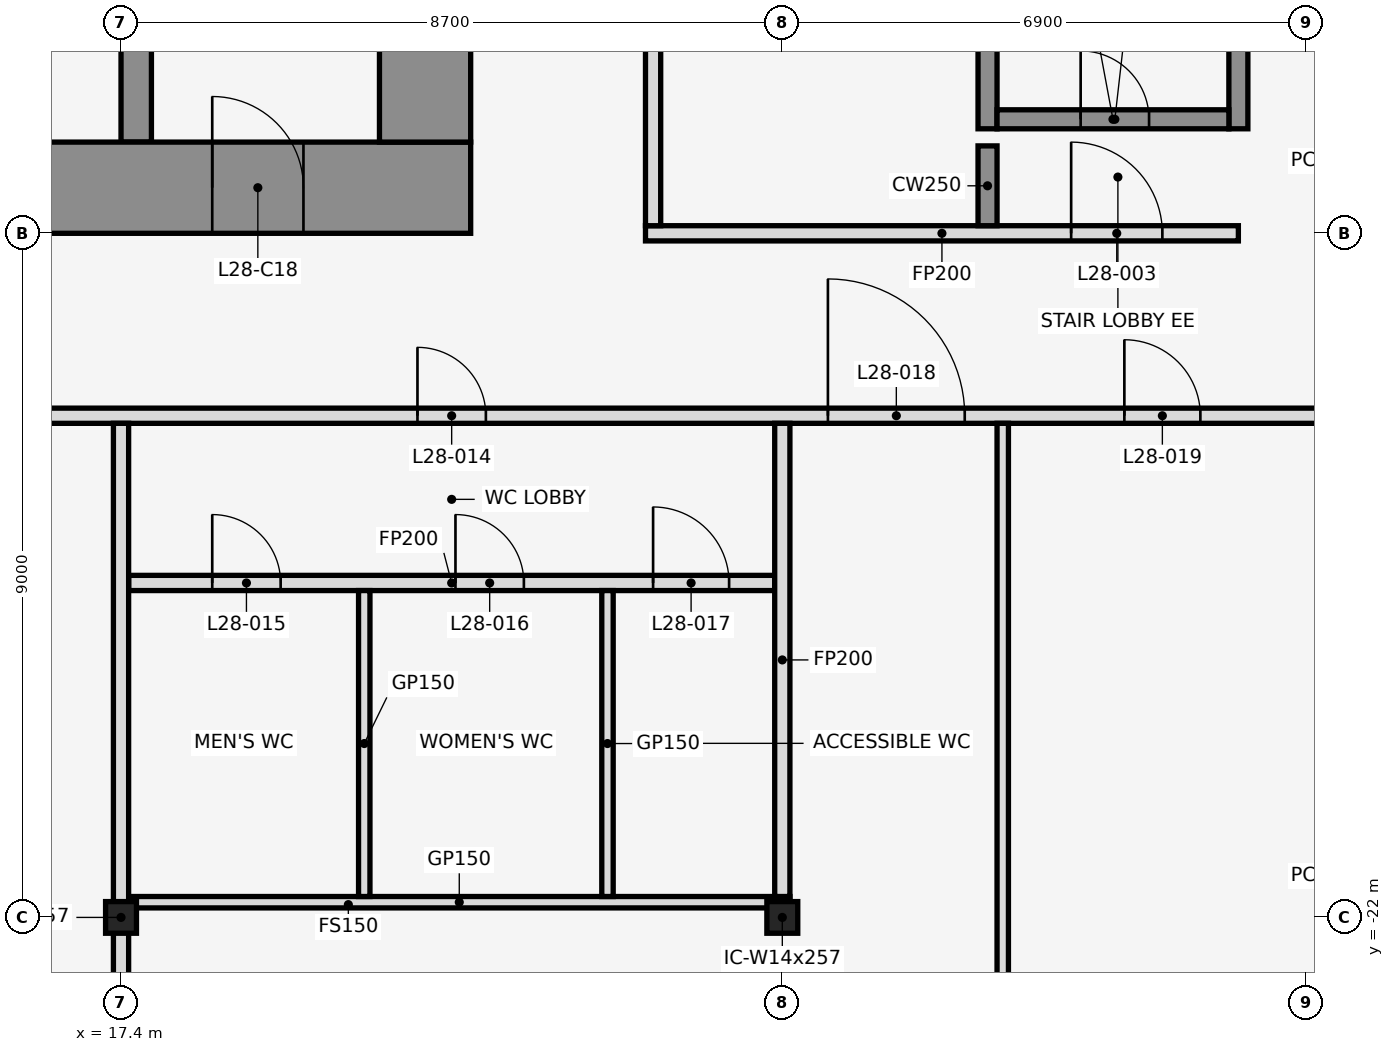
"""IFC4 building model, lengths in metres.
Left out: names, types, materials, properties, quantities, classifications, styles, units other than length and angle.
Written with IfcOpenShell. Run it as: python <this file> out.ifc"""

import sys

from ifc_helpers import new_model, si_unit, direction, frame, frame_2d, origin, origin_2d, place, context, subcontext, project, spatial, rectangle, i_section, extrude, element, fill, save


model = new_model("IFC4")
c1 = context("Model", 3, precision=1e-05, world=origin(), true_north=direction((0.0, 1.0)))
c2 = subcontext(c1, "Body", "Model", "MODEL_VIEW")
j1 = project(units=[si_unit("LENGTHUNIT", "METRE"), si_unit("PLANEANGLEUNIT", "RADIAN")], contexts=[c1])
p1 = place(None, origin())
s1 = spatial("IfcSite", under=j1, at=p1, CompositionType="ELEMENT")
p2 = place(p1, origin())
s2 = spatial("IfcBuilding", under=s1, at=p2, CompositionType="ELEMENT")
p3 = place(p2, frame((0.0, 0.0, 130.9)))
s3 = spatial("IfcBuildingStorey", under=s2, at=p3, CompositionType="ELEMENT", Elevation=130.9)
for number, where, z_axis, x_axis in (
    (1, (17.4, -22.0, 0.0), (0.0, 0.0, 1.0), (1.0, 0.0, 0.0)),
    (2, (26.1, -22.0, 0.0), (0.0, 0.0, 1.0), (1.0, 0.0, 0.0)),
):
    element("IfcColumn", number, at=place(p3, frame(where, z_axis=z_axis, x_axis=x_axis)), inside=s3, PredefinedType="COLUMN", context=c2, shape_type="SweptSolid", body=[
        extrude(i_section(OverallWidth=0.406, OverallDepth=0.417, WebThickness=0.03, FlangeThickness=0.048, at=origin_2d()), origin(), (0.0, 0.0, 1.0), 4.1),
    ])
for number, where, z_axis, x_axis in (
    (3, (28.8, -11.625, 0.0), (0.0, 0.0, 1.0), (0.0, 1.0, 0.0)),
    (4, (32.1, -11.625, 0.0), (0.0, 0.0, 1.0), (0.0, 1.0, 0.0)),
):
    element("IfcWall", number, at=place(p3, frame(where, z_axis=z_axis, x_axis=x_axis)), inside=s3, PredefinedType="SHEAR", context=c2, shape_type="SweptSolid", body=[
        extrude(rectangle(XDim=7.25, YDim=0.25, at=frame_2d((3.625, 0.0))), origin(), (0.0, 0.0, 1.0), 4.1),
    ])
p4 = place(p3, frame((28.925, -11.5, 0.0), z_axis=(0.0, 0.0, 1.0), x_axis=(1.0, 0.0, 0.0)))
e5 = element("IfcWall", 5, at=p4, inside=s3, PredefinedType="SHEAR", context=c2, shape_type="SweptSolid", body=[
    extrude(rectangle(XDim=3.05, YDim=0.25, at=frame_2d((1.525, 0.0))), origin(), (0.0, 0.0, 1.0), 4.1),
])
p5 = place(p4, frame((1.1, 0.0, 0.0)))
e6 = element("IfcOpeningElement", 6, at=p5, cuts=e5, PredefinedType="OPENING", context=c2, shape_type="SweptSolid", body=[
    extrude(rectangle(XDim=0.9, YDim=2.1, at=frame_2d((0.45, 1.05))), frame((0.0, 0.137, 0.0), z_axis=(0.0, -1.0, 0.0), x_axis=(1.0, 0.0, 0.0)), (0.0, 0.0, 1.0), 0.274),
])
p6 = place(p3, frame((17.5, -21.8, 0.0), z_axis=(0.0, 0.0, 1.0), x_axis=(1.0, 0.0, 0.0)))
e7 = element("IfcWall", 7, at=p6, inside=s3, PredefinedType="PARTITIONING", context=c2, shape_type="SweptSolid", body=[
    extrude(rectangle(XDim=8.7, YDim=0.15, at=frame_2d((4.35, 0.0))), origin(), (0.0, 0.0, 1.0), 2.968),
])
p7 = place(p3, frame((17.5, -17.6, 0.0), z_axis=(0.0, 0.0, 1.0), x_axis=(1.0, 0.0, 0.0)))
e8 = element("IfcWall", 8, at=p7, inside=s3, PredefinedType="PARTITIONING", context=c2, shape_type="SweptSolid", body=[
    extrude(rectangle(XDim=8.5, YDim=0.2, at=frame_2d((4.25, 0.0))), origin(), (0.0, 0.0, 1.0), 2.968),
])
p8 = place(p7, frame((1.1, 0.0, 0.0)))
e9 = element("IfcOpeningElement", 9, at=p8, cuts=e8, PredefinedType="OPENING", context=c2, shape_type="SweptSolid", body=[
    extrude(rectangle(XDim=0.9, YDim=2.1, at=frame_2d((0.45, 1.05))), frame((0.0, 0.112, 0.0), z_axis=(0.0, -1.0, 0.0), x_axis=(1.0, 0.0, 0.0)), (0.0, 0.0, 1.0), 0.224),
])
p9 = place(p7, frame((4.3, 0.0, 0.0)))
e10 = element("IfcOpeningElement", 10, at=p9, cuts=e8, PredefinedType="OPENING", context=c2, shape_type="SweptSolid", body=[
    extrude(rectangle(XDim=0.9, YDim=2.1, at=frame_2d((0.45, 1.05))), frame((0.0, 0.112, 0.0), z_axis=(0.0, -1.0, 0.0), x_axis=(1.0, 0.0, 0.0)), (0.0, 0.0, 1.0), 0.224),
])
p10 = place(p7, frame((6.9, 0.0, 0.0)))
e11 = element("IfcOpeningElement", 11, at=p10, cuts=e8, PredefinedType="OPENING", context=c2, shape_type="SweptSolid", body=[
    extrude(rectangle(XDim=1.0, YDim=2.1, at=frame_2d((0.5, 1.05))), frame((0.0, 0.112, 0.0), z_axis=(0.0, -1.0, 0.0), x_axis=(1.0, 0.0, 0.0)), (0.0, 0.0, 1.0), 0.224),
])
p11 = place(p3, frame((-33.37, -15.4, 0.0), z_axis=(0.0, 0.0, 1.0), x_axis=(1.0, 0.0, 0.0)))
e12 = element("IfcWall", 12, at=p11, inside=s3, PredefinedType="PARTITIONING", context=c2, shape_type="SweptSolid", body=[
    extrude(rectangle(XDim=66.74, YDim=0.2, at=frame_2d((33.37, 0.0))), origin(), (0.0, 0.0, 1.0), 2.968),
])
p12 = place(p11, frame((1.7, 0.0, 0.0)))
e13 = element("IfcOpeningElement", 13, at=p12, cuts=e12, PredefinedType="OPENING", context=c2, shape_type="SweptSolid", body=[
    extrude(rectangle(XDim=1.0, YDim=2.1, at=frame_2d((0.5, 1.05))), frame((0.0, 0.112, 0.0), z_axis=(0.0, -1.0, 0.0), x_axis=(1.0, 0.0, 0.0)), (0.0, 0.0, 1.0), 0.224),
])
p13 = place(p11, frame((7.87, 0.0, 0.0)))
e14 = element("IfcOpeningElement", 14, at=p13, cuts=e12, PredefinedType="OPENING", context=c2, shape_type="SweptSolid", body=[
    extrude(rectangle(XDim=1.8, YDim=2.1, at=frame_2d((0.9, 1.05))), frame((0.0, 0.112, 0.0), z_axis=(0.0, -1.0, 0.0), x_axis=(1.0, 0.0, 0.0)), (0.0, 0.0, 1.0), 0.224),
])
p14 = place(p11, frame((15.07, 0.0, 0.0)))
e15 = element("IfcOpeningElement", 15, at=p14, cuts=e12, PredefinedType="OPENING", context=c2, shape_type="SweptSolid", body=[
    extrude(rectangle(XDim=1.8, YDim=2.1, at=frame_2d((0.9, 1.05))), frame((0.0, 0.112, 0.0), z_axis=(0.0, -1.0, 0.0), x_axis=(1.0, 0.0, 0.0)), (0.0, 0.0, 1.0), 0.224),
])
p15 = place(p11, frame((22.27, 0.0, 0.0)))
e16 = element("IfcOpeningElement", 16, at=p15, cuts=e12, PredefinedType="OPENING", context=c2, shape_type="SweptSolid", body=[
    extrude(rectangle(XDim=1.8, YDim=2.1, at=frame_2d((0.9, 1.05))), frame((0.0, 0.112, 0.0), z_axis=(0.0, -1.0, 0.0), x_axis=(1.0, 0.0, 0.0)), (0.0, 0.0, 1.0), 0.224),
])
p16 = place(p11, frame((30.97, 0.0, 0.0)))
e17 = element("IfcOpeningElement", 17, at=p16, cuts=e12, PredefinedType="OPENING", context=c2, shape_type="SweptSolid", body=[
    extrude(rectangle(XDim=1.8, YDim=2.1, at=frame_2d((0.9, 1.05))), frame((0.0, 0.112, 0.0), z_axis=(0.0, -1.0, 0.0), x_axis=(1.0, 0.0, 0.0)), (0.0, 0.0, 1.0), 0.224),
])
p17 = place(p11, frame((39.67, 0.0, 0.0)))
e18 = element("IfcOpeningElement", 18, at=p17, cuts=e12, PredefinedType="OPENING", context=c2, shape_type="SweptSolid", body=[
    extrude(rectangle(XDim=1.8, YDim=2.1, at=frame_2d((0.9, 1.05))), frame((0.0, 0.112, 0.0), z_axis=(0.0, -1.0, 0.0), x_axis=(1.0, 0.0, 0.0)), (0.0, 0.0, 1.0), 0.224),
])
p18 = place(p11, frame((46.97, 0.0, 0.0)))
e19 = element("IfcOpeningElement", 19, at=p18, cuts=e12, PredefinedType="OPENING", context=c2, shape_type="SweptSolid", body=[
    extrude(rectangle(XDim=1.8, YDim=2.1, at=frame_2d((0.9, 1.05))), frame((0.0, 0.112, 0.0), z_axis=(0.0, -1.0, 0.0), x_axis=(1.0, 0.0, 0.0)), (0.0, 0.0, 1.0), 0.224),
])
p19 = place(p11, frame((54.67, 0.0, 0.0)))
e20 = element("IfcOpeningElement", 20, at=p19, cuts=e12, PredefinedType="OPENING", context=c2, shape_type="SweptSolid", body=[
    extrude(rectangle(XDim=0.9, YDim=2.1, at=frame_2d((0.45, 1.05))), frame((0.0, 0.112, 0.0), z_axis=(0.0, -1.0, 0.0), x_axis=(1.0, 0.0, 0.0)), (0.0, 0.0, 1.0), 0.224),
])
p20 = place(p11, frame((60.07, 0.0, 0.0)))
e21 = element("IfcOpeningElement", 21, at=p20, cuts=e12, PredefinedType="OPENING", context=c2, shape_type="SweptSolid", body=[
    extrude(rectangle(XDim=1.8, YDim=2.1, at=frame_2d((0.9, 1.05))), frame((0.0, 0.112, 0.0), z_axis=(0.0, -1.0, 0.0), x_axis=(1.0, 0.0, 0.0)), (0.0, 0.0, 1.0), 0.224),
])
p21 = place(p11, frame((63.97, 0.0, 0.0)))
e22 = element("IfcOpeningElement", 22, at=p21, cuts=e12, PredefinedType="OPENING", context=c2, shape_type="SweptSolid", body=[
    extrude(rectangle(XDim=1.0, YDim=2.1, at=frame_2d((0.5, 1.05))), frame((0.0, 0.112, 0.0), z_axis=(0.0, -1.0, 0.0), x_axis=(1.0, 0.0, 0.0)), (0.0, 0.0, 1.0), 0.224),
])
p22 = place(p3, frame((24.3, -13.0, 0.0), z_axis=(0.0, 0.0, 1.0), x_axis=(1.0, 0.0, 0.0)))
e23 = element("IfcWall", 23, at=p22, inside=s3, PredefinedType="PARTITIONING", context=c2, shape_type="SweptSolid", body=[
    extrude(rectangle(XDim=7.8, YDim=0.2, at=frame_2d((3.9, 0.0))), origin(), (0.0, 0.0, 1.0), 2.968),
])
p23 = place(p22, frame((5.6, 0.0, 0.0)))
e24 = element("IfcOpeningElement", 24, at=p23, cuts=e23, PredefinedType="OPENING", context=c2, shape_type="SweptSolid", body=[
    extrude(rectangle(XDim=1.2, YDim=2.1, at=frame_2d((0.6, 1.05))), frame((0.0, 0.112, 0.0), z_axis=(0.0, -1.0, 0.0), x_axis=(1.0, 0.0, 0.0)), (0.0, 0.0, 1.0), 0.224),
])
p24 = place(p3, frame((17.4, -33.744, 0.0), z_axis=(0.0, 0.0, 1.0), x_axis=(0.0, 1.0, 0.0)))
e25 = element("IfcWall", 25, at=p24, inside=s3, PredefinedType="PARTITIONING", context=c2, shape_type="SweptSolid", body=[
    extrude(rectangle(XDim=18.244, YDim=0.2, at=frame_2d((9.122, 0.0))), origin(), (0.0, 0.0, 1.0), 2.968),
])
for number, where, z_axis, x_axis in (
    (26, (20.6, -21.725, 0.0), (0.0, 0.0, 1.0), (0.0, 1.0, 0.0)),
    (27, (23.8, -21.725, 0.0), (0.0, 0.0, 1.0), (0.0, 1.0, 0.0)),
):
    element("IfcWall", number, at=place(p3, frame(where, z_axis=z_axis, x_axis=x_axis)), inside=s3, PredefinedType="PARTITIONING", context=c2, shape_type="SweptSolid", body=[
        extrude(rectangle(XDim=4.025, YDim=0.15, at=frame_2d((2.013, 0.0))), origin(), (0.0, 0.0, 1.0), 2.968),
    ])
p25 = place(p3, frame((24.4, -12.9, 0.0), z_axis=(0.0, 0.0, 1.0), x_axis=(0.0, 1.0, 0.0)))
e28 = element("IfcWall", 28, at=p25, inside=s3, PredefinedType="PARTITIONING", context=c2, shape_type="SweptSolid", body=[
    extrude(rectangle(XDim=12.69, YDim=0.2, at=frame_2d((6.345, 0.0))), origin(), (0.0, 0.0, 1.0), 2.968),
])
p26 = place(p25, frame((5.9, 0.0, 0.0)))
e29 = element("IfcOpeningElement", 29, at=p26, cuts=e28, PredefinedType="OPENING", context=c2, shape_type="SweptSolid", body=[
    extrude(rectangle(XDim=1.0, YDim=2.1, at=frame_2d((0.5, 1.05))), frame((0.0, 0.112, 0.0), z_axis=(0.0, -1.0, 0.0), x_axis=(1.0, 0.0, 0.0)), (0.0, 0.0, 1.0), 0.224),
])
p27 = place(p3, frame((26.1, -21.725, 0.0), z_axis=(0.0, 0.0, 1.0), x_axis=(0.0, 1.0, 0.0)))
e30 = element("IfcWall", 30, at=p27, inside=s3, PredefinedType="PARTITIONING", context=c2, shape_type="SweptSolid", body=[
    extrude(rectangle(XDim=6.225, YDim=0.2, at=frame_2d((3.113, 0.0))), origin(), (0.0, 0.0, 1.0), 2.968),
])
p28 = place(p3, frame((28.8, -12.9, 0.0), z_axis=(0.0, 0.0, 1.0), x_axis=(0.0, 1.0, 0.0)))
e31 = element("IfcWall", 31, at=p28, inside=s3, PredefinedType="SHEAR", context=c2, shape_type="SweptSolid", body=[
    extrude(rectangle(XDim=1.05, YDim=0.25, at=frame_2d((0.525, 0.0))), origin(), (0.0, 0.0, 1.0), 4.1),
])
p29 = place(p3, frame((29.0, -36.42, 0.0), z_axis=(0.0, 0.0, 1.0), x_axis=(0.0, 1.0, 0.0)))
e32 = element("IfcWall", 32, at=p29, inside=s3, PredefinedType="PARTITIONING", context=c2, shape_type="SweptSolid", body=[
    extrude(rectangle(XDim=20.92, YDim=0.15, at=frame_2d((10.46, 0.0))), origin(), (0.0, 0.0, 1.0), 2.968),
])
p30 = place(p3, frame((17.6, -11.8, 0.0), z_axis=(0.0, 0.0, 1.0), x_axis=(0.0, 1.0, 0.0)))
e33 = element("IfcWall", 33, at=p30, inside=s3, PredefinedType="SHEAR", context=c2, shape_type="SweptSolid", body=[
    extrude(rectangle(XDim=10.6, YDim=0.4, at=frame_2d((5.3, 0.0))), origin(), (0.0, 0.0, 1.0), 4.1),
])
p31 = place(p30, frame((1.25, 0.0, 0.0)))
e34 = element("IfcOpeningElement", 34, at=p31, cuts=e33, PredefinedType="OPENING", context=c2, shape_type="SweptSolid", body=[
    extrude(rectangle(XDim=1.1, YDim=2.1, at=frame_2d((0.55, 1.05))), frame((0.0, 0.212, 0.0), z_axis=(0.0, -1.0, 0.0), x_axis=(1.0, 0.0, 0.0)), (0.0, 0.0, 1.0), 0.424),
])
p32 = place(p30, frame((3.95, 0.0, 0.0)))
e35 = element("IfcOpeningElement", 35, at=p32, cuts=e33, PredefinedType="OPENING", context=c2, shape_type="SweptSolid", body=[
    extrude(rectangle(XDim=1.1, YDim=2.1, at=frame_2d((0.55, 1.05))), frame((0.0, 0.212, 0.0), z_axis=(0.0, -1.0, 0.0), x_axis=(1.0, 0.0, 0.0)), (0.0, 0.0, 1.0), 0.424),
])
p33 = place(p3, frame((-22.0, -12.4, 0.0), z_axis=(0.0, 0.0, 1.0), x_axis=(1.0, 0.0, 0.0)))
e36 = element("IfcWall", 36, at=p33, inside=s3, PredefinedType="SHEAR", context=c2, shape_type="SweptSolid", body=[
    extrude(rectangle(XDim=44.0, YDim=1.2, at=frame_2d((22.0, 0.0))), origin(), (0.0, 0.0, 1.0), 4.1),
])
p34 = place(p33, frame((2.2, 0.0, 0.0)))
e37 = element("IfcOpeningElement", 37, at=p34, cuts=e36, PredefinedType="OPENING", context=c2, shape_type="SweptSolid", body=[
    extrude(rectangle(XDim=1.2, YDim=2.1, at=frame_2d((0.6, 1.05))), frame((0.0, 0.612, 0.0), z_axis=(0.0, -1.0, 0.0), x_axis=(1.0, 0.0, 0.0)), (0.0, 0.0, 1.0), 1.224),
])
p35 = place(p33, frame((21.4, 0.0, 0.0)))
e38 = element("IfcOpeningElement", 38, at=p35, cuts=e36, PredefinedType="OPENING", context=c2, shape_type="SweptSolid", body=[
    extrude(rectangle(XDim=1.2, YDim=2.1, at=frame_2d((0.6, 1.05))), frame((0.0, 0.612, 0.0), z_axis=(0.0, -1.0, 0.0), x_axis=(1.0, 0.0, 0.0)), (0.0, 0.0, 1.0), 1.224),
])
p36 = place(p33, frame((40.6, 0.0, 0.0)))
e39 = element("IfcOpeningElement", 39, at=p36, cuts=e36, PredefinedType="OPENING", context=c2, shape_type="SweptSolid", body=[
    extrude(rectangle(XDim=1.2, YDim=2.1, at=frame_2d((0.6, 1.05))), frame((0.0, 0.612, 0.0), z_axis=(0.0, -1.0, 0.0), x_axis=(1.0, 0.0, 0.0)), (0.0, 0.0, 1.0), 1.224),
])
p37 = place(p33, frame((16.0, 0.0, 0.0)))
e40 = element("IfcOpeningElement", 40, at=p37, cuts=e36, PredefinedType="OPENING", context=c2, shape_type="SweptSolid", body=[
    extrude(rectangle(XDim=1.8, YDim=2.1, at=frame_2d((0.9, 1.05))), frame((0.0, 0.612, 0.0), z_axis=(0.0, -1.0, 0.0), x_axis=(1.0, 0.0, 0.0)), (0.0, 0.0, 1.0), 1.224),
])
p38 = place(p33, frame((6.3, 0.0, 0.0)))
e41 = element("IfcOpeningElement", 41, at=p38, cuts=e36, PredefinedType="OPENING", context=c2, shape_type="SweptSolid", body=[
    extrude(rectangle(XDim=1.2, YDim=2.1, at=frame_2d((0.6, 1.05))), frame((0.0, 0.612, 0.0), z_axis=(0.0, -1.0, 0.0), x_axis=(1.0, 0.0, 0.0)), (0.0, 0.0, 1.0), 1.224),
])
p39 = place(p33, frame((26.2, 0.0, 0.0)))
e42 = element("IfcOpeningElement", 42, at=p39, cuts=e36, PredefinedType="OPENING", context=c2, shape_type="SweptSolid", body=[
    extrude(rectangle(XDim=1.8, YDim=2.1, at=frame_2d((0.9, 1.05))), frame((0.0, 0.612, 0.0), z_axis=(0.0, -1.0, 0.0), x_axis=(1.0, 0.0, 0.0)), (0.0, 0.0, 1.0), 1.224),
])
p40 = place(p33, frame((36.5, 0.0, 0.0)))
e43 = element("IfcOpeningElement", 43, at=p40, cuts=e36, PredefinedType="OPENING", context=c2, shape_type="SweptSolid", body=[
    extrude(rectangle(XDim=1.2, YDim=2.1, at=frame_2d((0.6, 1.05))), frame((0.0, 0.612, 0.0), z_axis=(0.0, -1.0, 0.0), x_axis=(1.0, 0.0, 0.0)), (0.0, 0.0, 1.0), 1.224),
])
p41 = place(p3, frame((21.4, -11.8, 0.0), z_axis=(0.0, 0.0, 1.0), x_axis=(0.0, 1.0, 0.0)))
e44 = element("IfcWall", 44, at=p41, inside=s3, PredefinedType="SHEAR", context=c2, shape_type="SweptSolid", body=[
    extrude(rectangle(XDim=10.6, YDim=1.2, at=frame_2d((5.3, 0.0))), origin(), (0.0, 0.0, 1.0), 4.1),
])
p42 = place(p23, origin())
e45 = element("IfcDoor", 45, at=p42, inside=s3, OperationType="SINGLE_SWING_RIGHT", PredefinedType="DOOR", context=c2, shape_type="SweptSolid", body=[
    extrude(rectangle(XDim=1.2, YDim=2.1, at=frame_2d((0.6, 1.05))), frame((0.0, 0.025, 0.0), z_axis=(0.0, -1.0, 0.0), x_axis=(1.0, 0.0, 0.0)), (0.0, 0.0, 1.0), 0.05),
])
fill(e24, e45)
p43 = place(p5, origin())
e46 = element("IfcDoor", 46, at=p43, inside=s3, OperationType="SINGLE_SWING_LEFT", PredefinedType="DOOR", context=c2, shape_type="SweptSolid", body=[
    extrude(rectangle(XDim=0.9, YDim=2.1, at=frame_2d((0.45, 1.05))), frame((0.0, 0.025, 0.0), z_axis=(0.0, -1.0, 0.0), x_axis=(1.0, 0.0, 0.0)), (0.0, 0.0, 1.0), 0.05),
])
fill(e6, e46)
p44 = place(p19, frame((0.9, 0.0, 0.0), z_axis=(0.0, 0.0, 1.0), x_axis=(-1.0, 0.0, 0.0)))
e47 = element("IfcDoor", 47, at=p44, inside=s3, OperationType="SINGLE_SWING_RIGHT", PredefinedType="DOOR", context=c2, shape_type="SweptSolid", body=[
    extrude(rectangle(XDim=0.9, YDim=2.1, at=frame_2d((0.45, 1.05))), frame((0.0, 0.025, 0.0), z_axis=(0.0, -1.0, 0.0), x_axis=(1.0, 0.0, 0.0)), (0.0, 0.0, 1.0), 0.05),
])
fill(e20, e47)
p45 = place(p8, frame((0.9, 0.0, 0.0), z_axis=(0.0, 0.0, 1.0), x_axis=(-1.0, 0.0, 0.0)))
e48 = element("IfcDoor", 48, at=p45, inside=s3, OperationType="SINGLE_SWING_RIGHT", PredefinedType="DOOR", context=c2, shape_type="SweptSolid", body=[
    extrude(rectangle(XDim=0.9, YDim=2.1, at=frame_2d((0.45, 1.05))), frame((0.0, 0.025, 0.0), z_axis=(0.0, -1.0, 0.0), x_axis=(1.0, 0.0, 0.0)), (0.0, 0.0, 1.0), 0.05),
])
fill(e9, e48)
p46 = place(p9, frame((0.9, 0.0, 0.0), z_axis=(0.0, 0.0, 1.0), x_axis=(-1.0, 0.0, 0.0)))
e49 = element("IfcDoor", 49, at=p46, inside=s3, OperationType="SINGLE_SWING_LEFT", PredefinedType="DOOR", context=c2, shape_type="SweptSolid", body=[
    extrude(rectangle(XDim=0.9, YDim=2.1, at=frame_2d((0.45, 1.05))), frame((0.0, 0.025, 0.0), z_axis=(0.0, -1.0, 0.0), x_axis=(1.0, 0.0, 0.0)), (0.0, 0.0, 1.0), 0.05),
])
fill(e10, e49)
p47 = place(p10, frame((1.0, 0.0, 0.0), z_axis=(0.0, 0.0, 1.0), x_axis=(-1.0, 0.0, 0.0)))
e50 = element("IfcDoor", 50, at=p47, inside=s3, OperationType="SINGLE_SWING_RIGHT", PredefinedType="DOOR", context=c2, shape_type="SweptSolid", body=[
    extrude(rectangle(XDim=1.0, YDim=2.1, at=frame_2d((0.5, 1.05))), frame((0.0, 0.025, 0.0), z_axis=(0.0, -1.0, 0.0), x_axis=(1.0, 0.0, 0.0)), (0.0, 0.0, 1.0), 0.05),
])
fill(e11, e50)
p48 = place(p20, origin())
e51 = element("IfcDoor", 51, at=p48, inside=s3, OperationType="SINGLE_SWING_LEFT", PredefinedType="DOOR", context=c2, shape_type="SweptSolid", body=[
    extrude(rectangle(XDim=1.8, YDim=2.1, at=frame_2d((0.9, 1.05))), frame((0.0, 0.025, 0.0), z_axis=(0.0, -1.0, 0.0), x_axis=(1.0, 0.0, 0.0)), (0.0, 0.0, 1.0), 0.05),
])
fill(e21, e51)
p49 = place(p21, frame((1.0, 0.0, 0.0), z_axis=(0.0, 0.0, 1.0), x_axis=(-1.0, 0.0, 0.0)))
e52 = element("IfcDoor", 52, at=p49, inside=s3, OperationType="SINGLE_SWING_LEFT", PredefinedType="DOOR", context=c2, shape_type="SweptSolid", body=[
    extrude(rectangle(XDim=1.0, YDim=2.1, at=frame_2d((0.5, 1.05))), frame((0.0, 0.025, 0.0), z_axis=(0.0, -1.0, 0.0), x_axis=(1.0, 0.0, 0.0)), (0.0, 0.0, 1.0), 0.05),
])
fill(e22, e52)
p50 = place(p36, frame((1.2, 0.0, 0.0), z_axis=(0.0, 0.0, 1.0), x_axis=(-1.0, 0.0, 0.0)))
e53 = element("IfcDoor", 53, at=p50, inside=s3, OperationType="SINGLE_SWING_RIGHT", PredefinedType="DOOR", context=c2, shape_type="SweptSolid", body=[
    extrude(rectangle(XDim=1.2, YDim=2.1, at=frame_2d((0.6, 1.05))), frame((0.0, 0.025, 0.0), z_axis=(0.0, -1.0, 0.0), x_axis=(1.0, 0.0, 0.0)), (0.0, 0.0, 1.0), 0.05),
])
fill(e39, e53)
save(model, sys.argv[1])
